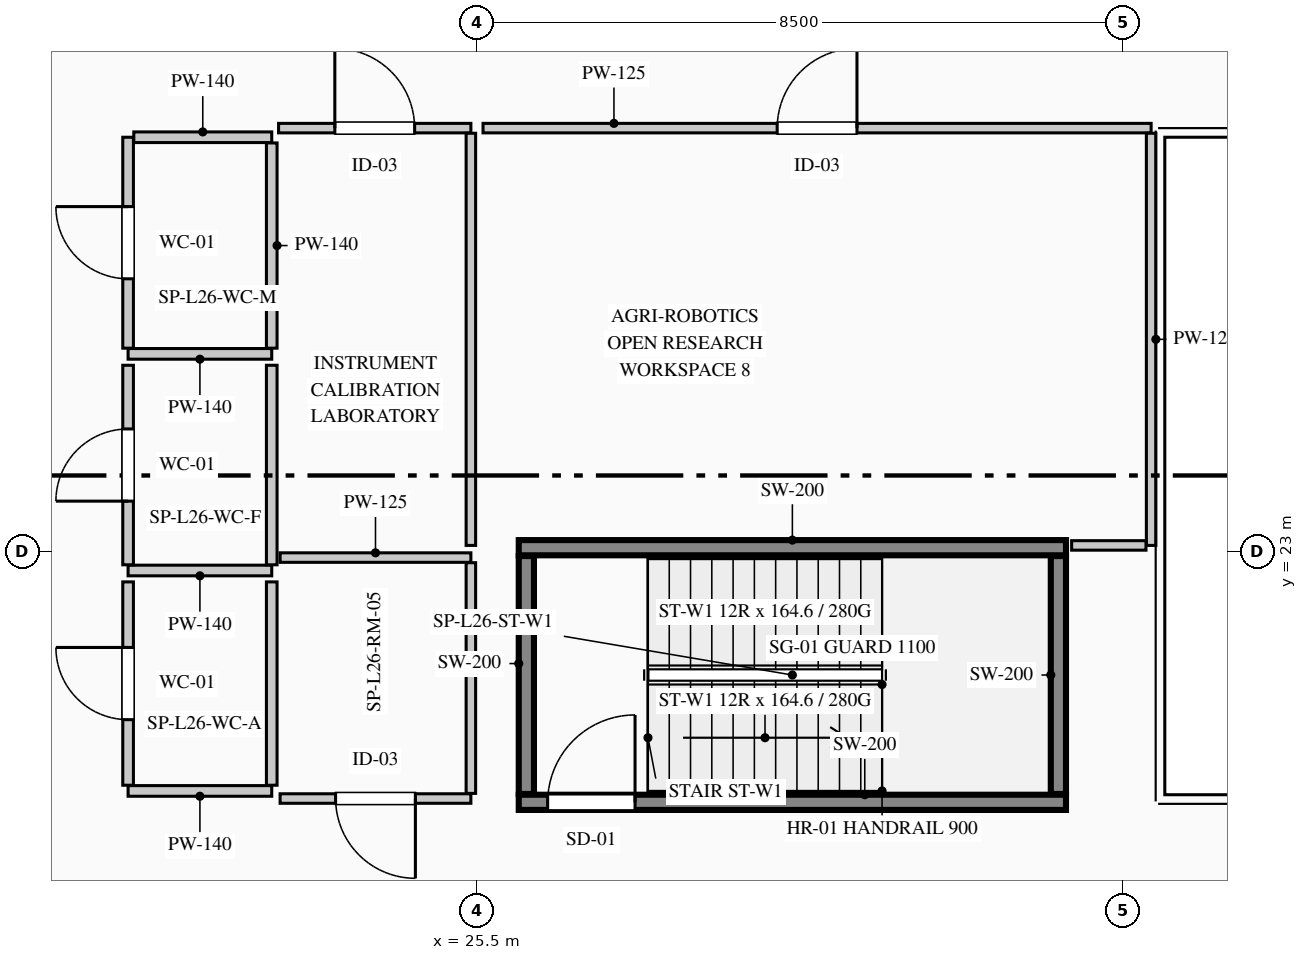
"""IFC4 building model, lengths in metres.
Left out: names, types, materials, properties, quantities, classifications, styles, units other than length and angle.
Written with IfcOpenShell. Run it as: python <this file> out.ifc"""

import sys

from ifc_helpers import new_model, si_unit, direction, frame, frame_2d, origin, place, context, subcontext, project, spatial, rectangle, extrude, element, fill, save


model = new_model("IFC4")
c1 = context("Model", 3, precision=1e-05, world=origin(), true_north=direction((0.0, 1.0)))
c2 = subcontext(c1, "Body", "Model", "MODEL_VIEW")
j1 = project(units=[si_unit("LENGTHUNIT", "METRE"), si_unit("PLANEANGLEUNIT", "RADIAN")], contexts=[c1])
p1 = place(None, origin())
s1 = spatial("IfcSite", under=j1, at=p1, CompositionType="ELEMENT")
p2 = place(p1, origin())
s2 = spatial("IfcBuilding", under=s1, at=p2, CompositionType="ELEMENT")
p3 = place(p2, frame((0.0, 0.0, 115.35)))
s3 = spatial("IfcBuildingStorey", under=s2, at=p3, CompositionType="ELEMENT", Elevation=115.35)
p4 = place(p3, frame((26.05, 19.7, 0.0), z_axis=(0.0, 0.0, 1.0), x_axis=(1.0, 0.0, 0.0)))
e1 = element("IfcWall", 1, at=p4, inside=s3, PredefinedType="SHEAR", context=c2, shape_type="SweptSolid", body=[
    extrude(rectangle(XDim=7.2, YDim=0.2, at=frame_2d((3.6, 0.0))), origin(), (0.0, 0.0, 1.0), 3.95),
])
p5 = place(p4, frame((0.38, 0.0, 0.0)))
e2 = element("IfcOpeningElement", 2, at=p5, cuts=e1, PredefinedType="OPENING", context=c2, shape_type="SweptSolid", body=[
    extrude(rectangle(XDim=1.15, YDim=2.2, at=frame_2d((0.575, 1.1))), frame((0.0, 0.11, 0.0), z_axis=(0.0, -1.0, 0.0), x_axis=(1.0, 0.0, 0.0)), (0.0, 0.0, 1.0), 0.22),
])
p6 = place(p3, frame((26.05, 23.05, 0.0), z_axis=(0.0, 0.0, 1.0), x_axis=(1.0, 0.0, 0.0)))
e3 = element("IfcWall", 3, at=p6, inside=s3, PredefinedType="SHEAR", context=c2, shape_type="SweptSolid", body=[
    extrude(rectangle(XDim=7.2, YDim=0.2, at=frame_2d((3.6, 0.0))), origin(), (0.0, 0.0, 1.0), 3.95),
])
for number, where, z_axis, x_axis in (
    (4, (26.15, 19.81, 0.0), (0.0, 0.0, 1.0), (0.0, 1.0, 0.0)),
    (5, (33.15, 19.81, 0.0), (0.0, 0.0, 1.0), (0.0, 1.0, 0.0)),
):
    element("IfcWall", number, at=place(p3, frame(where, z_axis=z_axis, x_axis=x_axis)), inside=s3, PredefinedType="SHEAR", context=c2, shape_type="SweptSolid", body=[
        extrude(rectangle(XDim=3.13, YDim=0.2, at=frame_2d((1.565, 0.0))), origin(), (0.0, 0.0, 1.0), 3.95),
    ])
p7 = place(p3, frame((22.8, 25.6, 0.0), z_axis=(0.0, 0.0, 1.0), x_axis=(-1.0, 0.0, 0.0)))
e6 = element("IfcWall", 6, at=p7, inside=s3, PredefinedType="PARTITIONING", context=c2, shape_type="SweptSolid", body=[
    extrude(rectangle(XDim=1.89, YDim=0.14, at=frame_2d((0.945, 0.0))), origin(), (0.0, 0.0, 1.0), 3.69),
])
p8 = place(p3, frame((20.91, 25.675, 0.0), z_axis=(0.0, 0.0, 1.0), x_axis=(0.0, 1.0, 0.0)))
e7 = element("IfcWall", 7, at=p8, inside=s3, PredefinedType="PARTITIONING", context=c2, shape_type="SweptSolid", body=[
    extrude(rectangle(XDim=2.775, YDim=0.14, at=frame_2d((1.387, 0.0))), origin(), (0.0, 0.0, 1.0), 3.69),
])
p9 = place(p8, frame((0.913, 0.0, 0.0)))
e8 = element("IfcOpeningElement", 8, at=p9, cuts=e7, PredefinedType="OPENING", context=c2, shape_type="SweptSolid", body=[
    extrude(rectangle(XDim=0.95, YDim=2.15, at=frame_2d((0.475, 1.075))), frame((0.0, 0.08, 0.0), z_axis=(0.0, -1.0, 0.0), x_axis=(1.0, 0.0, 0.0)), (0.0, 0.0, 1.0), 0.16),
])
p10 = place(p3, frame((20.985, 28.45, 0.0), z_axis=(0.0, 0.0, 1.0), x_axis=(1.0, 0.0, 0.0)))
e9 = element("IfcWall", 9, at=p10, inside=s3, PredefinedType="PARTITIONING", context=c2, shape_type="SweptSolid", body=[
    extrude(rectangle(XDim=1.815, YDim=0.14, at=frame_2d((0.907, 0.0))), origin(), (0.0, 0.0, 1.0), 3.69),
])
p11 = place(p3, frame((22.8, 28.375, 0.0), z_axis=(0.0, 0.0, 1.0), x_axis=(0.0, -1.0, 0.0)))
e10 = element("IfcWall", 10, at=p11, inside=s3, PredefinedType="PARTITIONING", context=c2, shape_type="SweptSolid", body=[
    extrude(rectangle(XDim=2.7, YDim=0.14, at=frame_2d((1.35, 0.0))), origin(), (0.0, 0.0, 1.0), 3.315),
])
p12 = place(p3, frame((22.8, 22.75, 0.0), z_axis=(0.0, 0.0, 1.0), x_axis=(-1.0, 0.0, 0.0)))
e11 = element("IfcWall", 11, at=p12, inside=s3, PredefinedType="PARTITIONING", context=c2, shape_type="SweptSolid", body=[
    extrude(rectangle(XDim=1.89, YDim=0.14, at=frame_2d((0.945, 0.0))), origin(), (0.0, 0.0, 1.0), 3.69),
])
p13 = place(p3, frame((20.91, 22.825, 0.0), z_axis=(0.0, 0.0, 1.0), x_axis=(0.0, 1.0, 0.0)))
e12 = element("IfcWall", 12, at=p13, inside=s3, PredefinedType="PARTITIONING", context=c2, shape_type="SweptSolid", body=[
    extrude(rectangle(XDim=2.625, YDim=0.14, at=frame_2d((1.312, 0.0))), origin(), (0.0, 0.0, 1.0), 3.69),
])
p14 = place(p13, frame((0.837, 0.0, 0.0)))
e13 = element("IfcOpeningElement", 13, at=p14, cuts=e12, PredefinedType="OPENING", context=c2, shape_type="SweptSolid", body=[
    extrude(rectangle(XDim=0.95, YDim=2.15, at=frame_2d((0.475, 1.075))), frame((0.0, 0.08, 0.0), z_axis=(0.0, -1.0, 0.0), x_axis=(1.0, 0.0, 0.0)), (0.0, 0.0, 1.0), 0.16),
])
p15 = place(p3, frame((22.8, 25.45, 0.0), z_axis=(0.0, 0.0, 1.0), x_axis=(0.0, -1.0, 0.0)))
e14 = element("IfcWall", 14, at=p15, inside=s3, PredefinedType="PARTITIONING", context=c2, shape_type="SweptSolid", body=[
    extrude(rectangle(XDim=2.625, YDim=0.14, at=frame_2d((1.312, 0.0))), origin(), (0.0, 0.0, 1.0), 3.315),
])
p16 = place(p3, frame((22.8, 19.85, 0.0), z_axis=(0.0, 0.0, 1.0), x_axis=(-1.0, 0.0, 0.0)))
e15 = element("IfcWall", 15, at=p16, inside=s3, PredefinedType="PARTITIONING", context=c2, shape_type="SweptSolid", body=[
    extrude(rectangle(XDim=1.89, YDim=0.14, at=frame_2d((0.945, 0.0))), origin(), (0.0, 0.0, 1.0), 3.69),
])
p17 = place(p3, frame((20.91, 19.925, 0.0), z_axis=(0.0, 0.0, 1.0), x_axis=(0.0, 1.0, 0.0)))
e16 = element("IfcWall", 16, at=p17, inside=s3, PredefinedType="PARTITIONING", context=c2, shape_type="SweptSolid", body=[
    extrude(rectangle(XDim=2.675, YDim=0.14, at=frame_2d((1.337, 0.0))), origin(), (0.0, 0.0, 1.0), 3.69),
])
p18 = place(p17, frame((0.863, 0.0, 0.0)))
e17 = element("IfcOpeningElement", 17, at=p18, cuts=e16, PredefinedType="OPENING", context=c2, shape_type="SweptSolid", body=[
    extrude(rectangle(XDim=0.95, YDim=2.15, at=frame_2d((0.475, 1.075))), frame((0.0, 0.08, 0.0), z_axis=(0.0, -1.0, 0.0), x_axis=(1.0, 0.0, 0.0)), (0.0, 0.0, 1.0), 0.16),
])
p19 = place(p3, frame((22.8, 22.6, 0.0), z_axis=(0.0, 0.0, 1.0), x_axis=(0.0, -1.0, 0.0)))
e18 = element("IfcWall", 18, at=p19, inside=s3, PredefinedType="PARTITIONING", context=c2, shape_type="SweptSolid", body=[
    extrude(rectangle(XDim=2.675, YDim=0.14, at=frame_2d((1.337, 0.0))), origin(), (0.0, 0.0, 1.0), 3.315),
])
p20 = place(p3, frame((25.42, 19.75, 0.0), z_axis=(0.0, 0.0, 1.0), x_axis=(-1.0, 0.0, 0.0)))
e19 = element("IfcWall", 19, at=p20, inside=s3, PredefinedType="PARTITIONING", context=c2, shape_type="SweptSolid", body=[
    extrude(rectangle(XDim=2.51, YDim=0.125, at=frame_2d((1.255, 0.0))), origin(), (0.0, 0.0, 1.0), 3.69),
])
p21 = place(p20, frame((0.73, 0.0, 0.0)))
e20 = element("IfcOpeningElement", 20, at=p21, cuts=e19, PredefinedType="OPENING", context=c2, shape_type="SweptSolid", body=[
    extrude(rectangle(XDim=1.05, YDim=2.15, at=frame_2d((0.525, 1.075))), frame((0.0, 0.073, 0.0), z_axis=(0.0, -1.0, 0.0), x_axis=(1.0, 0.0, 0.0)), (0.0, 0.0, 1.0), 0.145),
])
p22 = place(p3, frame((22.91, 22.92, 0.0), z_axis=(0.0, 0.0, 1.0), x_axis=(1.0, 0.0, 0.0)))
e21 = element("IfcWall", 21, at=p22, inside=s3, PredefinedType="PARTITIONING", context=c2, shape_type="SweptSolid", body=[
    extrude(rectangle(XDim=2.51, YDim=0.125, at=frame_2d((1.255, 0.0))), origin(), (0.0, 0.0, 1.0), 3.69),
])
p23 = place(p3, frame((25.42, 22.853, 0.0), z_axis=(0.0, 0.0, 1.0), x_axis=(0.0, -1.0, 0.0)))
e22 = element("IfcWall", 22, at=p23, inside=s3, PredefinedType="PARTITIONING", context=c2, shape_type="SweptSolid", body=[
    extrude(rectangle(XDim=3.035, YDim=0.125, at=frame_2d((1.518, 0.0))), origin(), (0.0, 0.0, 1.0), 2.875),
])
p24 = place(p3, frame((22.89, 28.57, 0.0), z_axis=(0.0, 0.0, 1.0), x_axis=(1.0, 0.0, 0.0)))
e23 = element("IfcWall", 23, at=p24, inside=s3, PredefinedType="PARTITIONING", context=c2, shape_type="SweptSolid", body=[
    extrude(rectangle(XDim=2.53, YDim=0.125, at=frame_2d((1.265, 0.0))), origin(), (0.0, 0.0, 1.0), 3.69),
])
p25 = place(p24, frame((0.74, 0.0, 0.0)))
e24 = element("IfcOpeningElement", 24, at=p25, cuts=e23, PredefinedType="OPENING", context=c2, shape_type="SweptSolid", body=[
    extrude(rectangle(XDim=1.05, YDim=2.15, at=frame_2d((0.525, 1.075))), frame((0.0, 0.073, 0.0), z_axis=(0.0, -1.0, 0.0), x_axis=(1.0, 0.0, 0.0)), (0.0, 0.0, 1.0), 0.145),
])
p26 = place(p3, frame((25.42, 28.502, 0.0), z_axis=(0.0, 0.0, 1.0), x_axis=(0.0, -1.0, 0.0)))
e25 = element("IfcWall", 25, at=p26, inside=s3, PredefinedType="PARTITIONING", context=c2, shape_type="SweptSolid", body=[
    extrude(rectangle(XDim=5.422, YDim=0.125, at=frame_2d((2.711, 0.0))), origin(), (0.0, 0.0, 1.0), 2.875),
])
p27 = place(p3, frame((25.58, 28.57, 0.0), z_axis=(0.0, 0.0, 1.0), x_axis=(1.0, 0.0, 0.0)))
e26 = element("IfcWall", 26, at=p27, inside=s3, PredefinedType="PARTITIONING", context=c2, shape_type="SweptSolid", body=[
    extrude(rectangle(XDim=8.79, YDim=0.125, at=frame_2d((4.395, 0.0))), origin(), (0.0, 0.0, 1.0), 3.475),
])
p28 = place(p27, frame((3.87, 0.0, 0.0)))
e27 = element("IfcOpeningElement", 27, at=p28, cuts=e26, PredefinedType="OPENING", context=c2, shape_type="SweptSolid", body=[
    extrude(rectangle(XDim=1.05, YDim=2.15, at=frame_2d((0.525, 1.075))), frame((0.0, 0.073, 0.0), z_axis=(0.0, -1.0, 0.0), x_axis=(1.0, 0.0, 0.0)), (0.0, 0.0, 1.0), 0.145),
])
p29 = place(p3, frame((34.37, 28.502, 0.0), z_axis=(0.0, 0.0, 1.0), x_axis=(0.0, -1.0, 0.0)))
e28 = element("IfcWall", 28, at=p29, inside=s3, PredefinedType="PARTITIONING", context=c2, shape_type="SweptSolid", body=[
    extrude(rectangle(XDim=5.422, YDim=0.125, at=frame_2d((2.711, 0.0))), origin(), (0.0, 0.0, 1.0), 3.69),
])
p30 = place(p3, frame((34.302, 23.08, 0.0), z_axis=(0.0, 0.0, 1.0), x_axis=(-1.0, 0.0, 0.0)))
e29 = element("IfcWall", 29, at=p30, inside=s3, PredefinedType="PARTITIONING", context=c2, shape_type="SweptSolid", body=[
    extrude(rectangle(XDim=0.978, YDim=0.125, at=frame_2d((0.489, 0.0))), origin(), (0.0, 0.0, 1.0), 3.69),
])
p31 = place(p5, origin())
e30 = element("IfcDoor", 30, at=p31, inside=s3, OperationType="SINGLE_SWING_RIGHT", PredefinedType="DOOR", context=c2, shape_type="SweptSolid", body=[
    extrude(rectangle(XDim=1.15, YDim=2.2, at=frame_2d((0.575, 1.1))), frame((0.0, 0.025, 0.0), z_axis=(0.0, -1.0, 0.0), x_axis=(1.0, 0.0, 0.0)), (0.0, 0.0, 1.0), 0.05),
])
fill(e2, e30)
p32 = place(p9, origin())
e31 = element("IfcDoor", 31, at=p32, inside=s3, OperationType="SINGLE_SWING_RIGHT", PredefinedType="DOOR", context=c2, shape_type="SweptSolid", body=[
    extrude(rectangle(XDim=0.95, YDim=2.15, at=frame_2d((0.475, 1.075))), frame((0.0, 0.025, 0.0), z_axis=(0.0, -1.0, 0.0), x_axis=(1.0, 0.0, 0.0)), (0.0, 0.0, 1.0), 0.05),
])
fill(e8, e31)
p33 = place(p14, origin())
e32 = element("IfcDoor", 32, at=p33, inside=s3, OperationType="SINGLE_SWING_LEFT", PredefinedType="DOOR", context=c2, shape_type="SweptSolid", body=[
    extrude(rectangle(XDim=0.95, YDim=2.15, at=frame_2d((0.475, 1.075))), frame((0.0, 0.025, 0.0), z_axis=(0.0, -1.0, 0.0), x_axis=(1.0, 0.0, 0.0)), (0.0, 0.0, 1.0), 0.05),
])
fill(e13, e32)
p34 = place(p18, origin())
e33 = element("IfcDoor", 33, at=p34, inside=s3, OperationType="SINGLE_SWING_RIGHT", PredefinedType="DOOR", context=c2, shape_type="SweptSolid", body=[
    extrude(rectangle(XDim=0.95, YDim=2.15, at=frame_2d((0.475, 1.075))), frame((0.0, 0.025, 0.0), z_axis=(0.0, -1.0, 0.0), x_axis=(1.0, 0.0, 0.0)), (0.0, 0.0, 1.0), 0.05),
])
fill(e17, e33)
p35 = place(p21, origin())
e34 = element("IfcDoor", 34, at=p35, inside=s3, OperationType="SINGLE_SWING_LEFT", PredefinedType="DOOR", context=c2, shape_type="SweptSolid", body=[
    extrude(rectangle(XDim=1.05, YDim=2.15, at=frame_2d((0.525, 1.075))), frame((0.0, 0.025, 0.0), z_axis=(0.0, -1.0, 0.0), x_axis=(1.0, 0.0, 0.0)), (0.0, 0.0, 1.0), 0.05),
])
fill(e20, e34)
p36 = place(p25, origin())
e35 = element("IfcDoor", 35, at=p36, inside=s3, OperationType="SINGLE_SWING_LEFT", PredefinedType="DOOR", context=c2, shape_type="SweptSolid", body=[
    extrude(rectangle(XDim=1.05, YDim=2.15, at=frame_2d((0.525, 1.075))), frame((0.0, 0.025, 0.0), z_axis=(0.0, -1.0, 0.0), x_axis=(1.0, 0.0, 0.0)), (0.0, 0.0, 1.0), 0.05),
])
fill(e24, e35)
p37 = place(p28, origin())
e36 = element("IfcDoor", 36, at=p37, inside=s3, OperationType="SINGLE_SWING_RIGHT", PredefinedType="DOOR", context=c2, shape_type="SweptSolid", body=[
    extrude(rectangle(XDim=1.05, YDim=2.15, at=frame_2d((0.525, 1.075))), frame((0.0, 0.025, 0.0), z_axis=(0.0, -1.0, 0.0), x_axis=(1.0, 0.0, 0.0)), (0.0, 0.0, 1.0), 0.05),
])
fill(e27, e36)
save(model, sys.argv[1])
